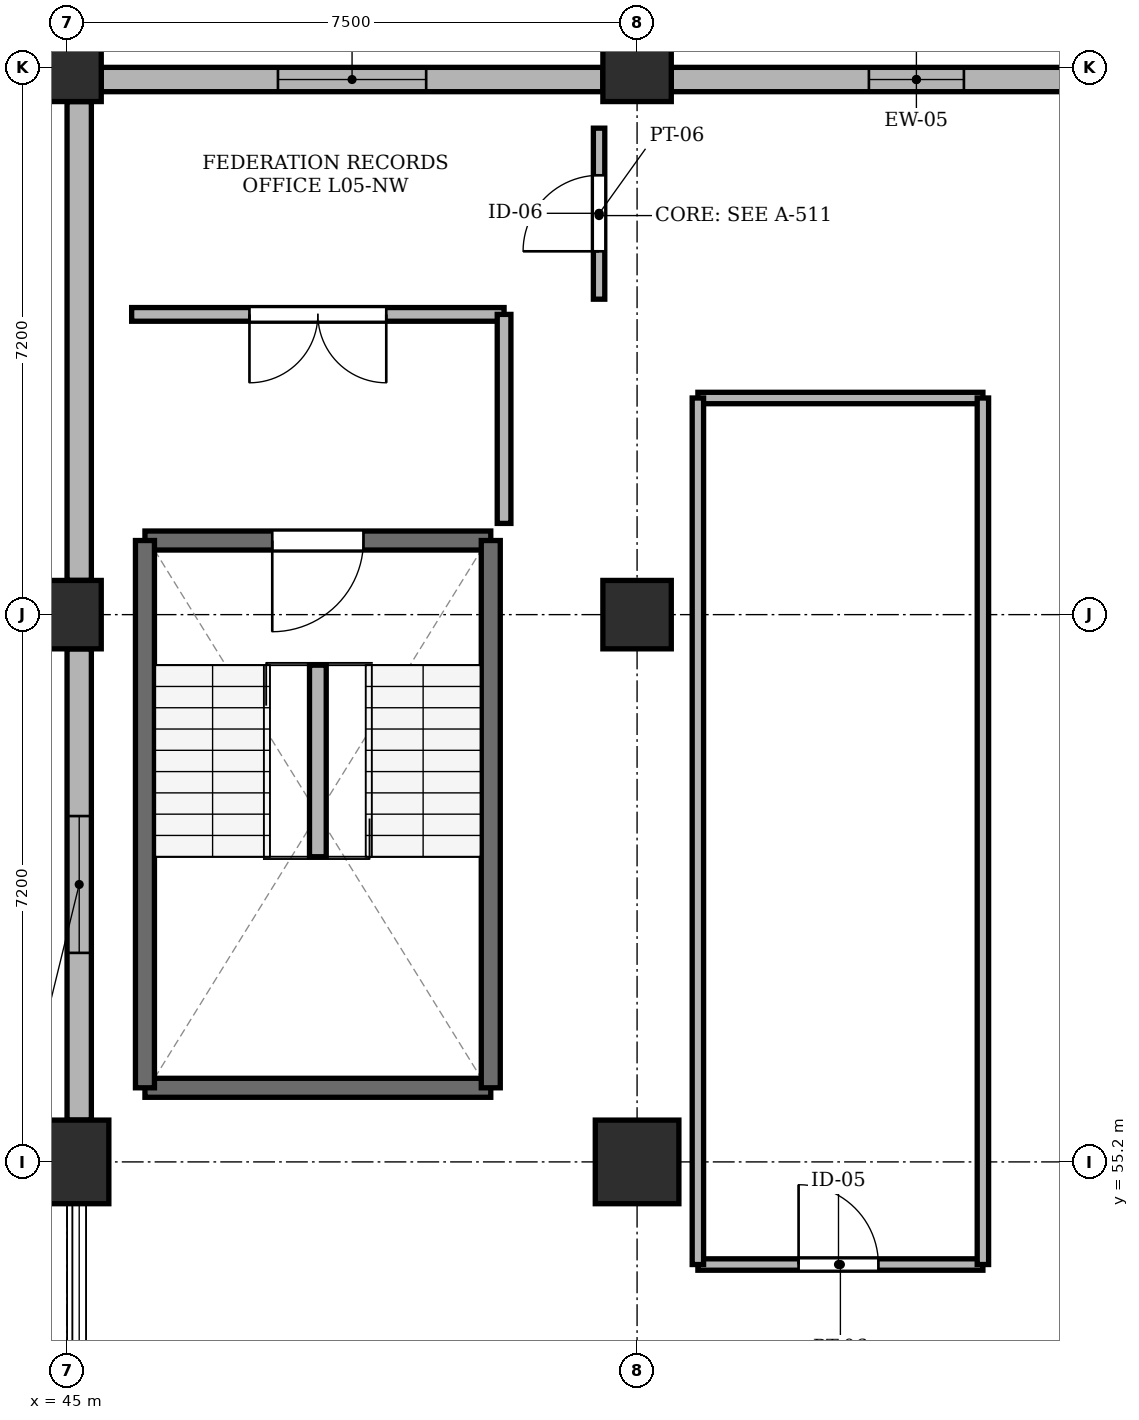
"""IFC4 building model, lengths in metres.
Left out: names, types, materials, properties, quantities, classifications, styles, units other than length and angle.
Written with IfcOpenShell. Run it as: python <this file> out.ifc"""

import sys

from ifc_helpers import new_model, si_unit, direction, frame, frame_2d, origin, origin_2d, place, context, subcontext, project, spatial, rectangle, extrude, element, fill, save


model = new_model("IFC4")
c1 = context("Model", 3, precision=1e-05, world=origin(), true_north=direction((0.0, 1.0)))
c2 = subcontext(c1, "Body", "Model", "MODEL_VIEW")
j1 = project(units=[si_unit("LENGTHUNIT", "METRE"), si_unit("PLANEANGLEUNIT", "RADIAN")], contexts=[c1])
p1 = place(None, origin())
s1 = spatial("IfcSite", under=j1, at=p1, CompositionType="ELEMENT")
p2 = place(p1, origin())
s2 = spatial("IfcBuilding", under=s1, at=p2, CompositionType="ELEMENT")
p3 = place(p2, frame((0.0, 0.0, 27.55)))
s3 = spatial("IfcBuildingStorey", under=s2, at=p3, CompositionType="ELEMENT", Elevation=27.55)
p4 = place(p3, frame((45.0, 55.2, -0.26), z_axis=(0.0, 0.0, 1.0), x_axis=(1.0, 0.0, 0.0)))
e1 = element("IfcColumn", 1, at=p4, inside=s3, PredefinedType="COLUMN", context=c2, shape_type="SweptSolid", body=[
    extrude(rectangle(XDim=1.1, YDim=1.1, at=origin_2d()), origin(), (0.0, 0.0, 1.0), 3.25),
])
for number, where, z_axis, x_axis in (
    (2, (45.0, 62.4, -0.26), (0.0, 0.0, 1.0), (1.0, 0.0, 0.0)),
    (3, (45.0, 69.6, -0.26), (0.0, 0.0, 1.0), (1.0, 0.0, 0.0)),
):
    element("IfcColumn", number, at=place(p3, frame(where, z_axis=z_axis, x_axis=x_axis)), inside=s3, PredefinedType="COLUMN", context=c2, shape_type="SweptSolid", body=[
        extrude(rectangle(XDim=0.9, YDim=0.9, at=origin_2d()), origin(), (0.0, 0.0, 1.0), 3.25),
    ])
p5 = place(p3, frame((52.5, 55.2, -0.26), z_axis=(0.0, 0.0, 1.0), x_axis=(1.0, 0.0, 0.0)))
e4 = element("IfcColumn", 4, at=p5, inside=s3, PredefinedType="COLUMN", context=c2, shape_type="SweptSolid", body=[
    extrude(rectangle(XDim=1.1, YDim=1.1, at=origin_2d()), origin(), (0.0, 0.0, 1.0), 3.25),
])
for number, where, z_axis, x_axis in (
    (5, (52.5, 62.4, -0.26), (0.0, 0.0, 1.0), (1.0, 0.0, 0.0)),
    (6, (52.5, 69.6, -0.26), (0.0, 0.0, 1.0), (1.0, 0.0, 0.0)),
):
    element("IfcColumn", number, at=place(p3, frame(where, z_axis=z_axis, x_axis=x_axis)), inside=s3, PredefinedType="COLUMN", context=c2, shape_type="SweptSolid", body=[
        extrude(rectangle(XDim=0.9, YDim=0.9, at=origin_2d()), origin(), (0.0, 0.0, 1.0), 3.25),
    ])
p6 = place(p3, frame((59.4, 69.44, 0.0), z_axis=(0.0, 0.0, 1.0), x_axis=(-1.0, 0.0, 0.0)))
e7 = element("IfcWall", 7, at=p6, inside=s3, PredefinedType="SOLIDWALL", context=c2, shape_type="SweptSolid", body=[
    extrude(rectangle(XDim=6.45, YDim=0.32, at=frame_2d((3.225, 0.0))), origin(), (0.0, 0.0, 1.0), 2.53),
])
p7 = place(p6, frame((2.6, 0.0, 0.62)))
e8 = element("IfcOpeningElement", 8, at=p7, cuts=e7, PredefinedType="OPENING", context=c2, shape_type="SweptSolid", body=[
    extrude(rectangle(XDim=1.25, YDim=1.75, at=frame_2d((0.625, 0.875))), frame((0.0, 0.172, 0.0), z_axis=(0.0, -1.0, 0.0), x_axis=(1.0, 0.0, 0.0)), (0.0, 0.0, 1.0), 0.344),
])
p8 = place(p3, frame((52.05, 69.44, 0.0), z_axis=(0.0, 0.0, 1.0), x_axis=(-1.0, 0.0, 0.0)))
e9 = element("IfcWall", 9, at=p8, inside=s3, PredefinedType="SOLIDWALL", context=c2, shape_type="SweptSolid", body=[
    extrude(rectangle(XDim=6.6, YDim=0.32, at=frame_2d((3.3, 0.0))), origin(), (0.0, 0.0, 1.0), 2.53),
])
p9 = place(p8, frame((2.325, 0.0, 0.62)))
e10 = element("IfcOpeningElement", 10, at=p9, cuts=e9, PredefinedType="OPENING", context=c2, shape_type="SweptSolid", body=[
    extrude(rectangle(XDim=1.95, YDim=1.81, at=frame_2d((0.975, 0.905))), frame((0.0, 0.172, 0.0), z_axis=(0.0, -1.0, 0.0), x_axis=(1.0, 0.0, 0.0)), (0.0, 0.0, 1.0), 0.344),
])
p10 = place(p3, frame((45.16, 69.15, 0.0), z_axis=(0.0, 0.0, 1.0), x_axis=(0.0, -1.0, 0.0)))
e11 = element("IfcWall", 11, at=p10, inside=s3, PredefinedType="SOLIDWALL", context=c2, shape_type="SweptSolid", body=[
    extrude(rectangle(XDim=6.3, YDim=0.32, at=frame_2d((3.15, 0.0))), origin(), (0.0, 0.0, 1.0), 2.53),
])
p11 = place(p3, frame((45.16, 61.95, 0.0), z_axis=(0.0, 0.0, 1.0), x_axis=(0.0, -1.0, 0.0)))
e12 = element("IfcWall", 12, at=p11, inside=s3, PredefinedType="SOLIDWALL", context=c2, shape_type="SweptSolid", body=[
    extrude(rectangle(XDim=6.2, YDim=0.32, at=frame_2d((3.1, 0.0))), origin(), (0.0, 0.0, 1.0), 2.53),
])
p12 = place(p11, frame((2.2, 0.0, 0.62)))
e13 = element("IfcOpeningElement", 13, at=p12, cuts=e12, PredefinedType="OPENING", context=c2, shape_type="SweptSolid", body=[
    extrude(rectangle(XDim=1.8, YDim=1.81, at=frame_2d((0.9, 0.905))), frame((0.0, 0.172, 0.0), z_axis=(0.0, -1.0, 0.0), x_axis=(1.0, 0.0, 0.0)), (0.0, 0.0, 1.0), 0.344),
])
p13 = place(p3, frame((46.025, 56.175, 0.0), z_axis=(0.0, 0.0, 1.0), x_axis=(1.0, 0.0, 0.0)))
e14 = element("IfcWall", 14, at=p13, inside=s3, PredefinedType="SHEAR", context=c2, shape_type="SweptSolid", body=[
    extrude(rectangle(XDim=4.55, YDim=0.25, at=frame_2d((2.275, 0.0))), origin(), (0.0, 0.0, 1.0), 2.99),
])
p14 = place(p3, frame((50.575, 63.375, 0.0), z_axis=(0.0, 0.0, 1.0), x_axis=(-1.0, 0.0, 0.0)))
e15 = element("IfcWall", 15, at=p14, inside=s3, PredefinedType="SHEAR", context=c2, shape_type="SweptSolid", body=[
    extrude(rectangle(XDim=4.55, YDim=0.25, at=frame_2d((2.275, 0.0))), origin(), (0.0, 0.0, 1.0), 2.99),
])
p15 = place(p14, frame((1.675, 0.0, 0.0)))
e16 = element("IfcOpeningElement", 16, at=p15, cuts=e15, PredefinedType="OPENING", context=c2, shape_type="SweptSolid", body=[
    extrude(rectangle(XDim=1.2, YDim=2.2, at=frame_2d((0.6, 1.1))), frame((0.0, 0.137, 0.0), z_axis=(0.0, -1.0, 0.0), x_axis=(1.0, 0.0, 0.0)), (0.0, 0.0, 1.0), 0.274),
])
for number, where, z_axis, x_axis in (
    (17, (46.025, 63.375, 0.0), (0.0, 0.0, 1.0), (0.0, -1.0, 0.0)),
    (18, (50.575, 56.175, 0.0), (0.0, 0.0, 1.0), (0.0, 1.0, 0.0)),
):
    element("IfcWall", number, at=place(p3, frame(where, z_axis=z_axis, x_axis=x_axis)), inside=s3, PredefinedType="SHEAR", context=c2, shape_type="SweptSolid", body=[
        extrude(rectangle(XDim=7.2, YDim=0.25, at=frame_2d((3.6, 0.0))), origin(), (0.0, 0.0, 1.0), 2.99),
    ])
p16 = place(p3, frame((48.3, 59.215, 0.0), z_axis=(0.0, 0.0, 1.0), x_axis=(0.0, 1.0, 0.0)))
e19 = element("IfcWall", 19, at=p16, inside=s3, PredefinedType="PARTITIONING", context=c2, shape_type="SweptSolid", body=[
    extrude(rectangle(XDim=2.52, YDim=0.22, at=frame_2d((1.26, 0.0))), origin(), (0.0, 0.0, 1.0), 2.99),
])
p17 = place(p3, frame((45.85, 66.35, 0.0), z_axis=(0.0, 0.0, 1.0), x_axis=(1.0, 0.0, 0.0)))
e20 = element("IfcWall", 20, at=p17, inside=s3, PredefinedType="PARTITIONING", context=c2, shape_type="SweptSolid", body=[
    extrude(rectangle(XDim=4.9, YDim=0.18, at=frame_2d((2.45, 0.0))), origin(), (0.0, 0.0, 1.0), 2.53),
])
p18 = place(p17, frame((1.55, 0.0, 0.0)))
e21 = element("IfcOpeningElement", 21, at=p18, cuts=e20, PredefinedType="OPENING", context=c2, shape_type="SweptSolid", body=[
    extrude(rectangle(XDim=1.8, YDim=2.2, at=frame_2d((0.9, 1.1))), frame((0.0, 0.102, 0.0), z_axis=(0.0, -1.0, 0.0), x_axis=(1.0, 0.0, 0.0)), (0.0, 0.0, 1.0), 0.204),
])
p19 = place(p3, frame((50.75, 63.6, 0.0), z_axis=(0.0, 0.0, 1.0), x_axis=(0.0, 1.0, 0.0)))
e22 = element("IfcWall", 22, at=p19, inside=s3, PredefinedType="PARTITIONING", context=c2, shape_type="SweptSolid", body=[
    extrude(rectangle(XDim=2.75, YDim=0.18, at=frame_2d((1.375, 0.0))), origin(), (0.0, 0.0, 1.0), 2.53),
])
p20 = place(p3, frame((53.3, 53.85, 0.0), z_axis=(0.0, 0.0, 1.0), x_axis=(1.0, 0.0, 0.0)))
e23 = element("IfcWall", 23, at=p20, inside=s3, PredefinedType="PARTITIONING", context=c2, shape_type="SweptSolid", body=[
    extrude(rectangle(XDim=3.75, YDim=0.15, at=frame_2d((1.875, 0.0))), origin(), (0.0, 0.0, 1.0), 2.53),
])
p21 = place(p20, frame((1.325, 0.0, 0.0)))
e24 = element("IfcOpeningElement", 24, at=p21, cuts=e23, PredefinedType="OPENING", context=c2, shape_type="SweptSolid", body=[
    extrude(rectangle(XDim=1.05, YDim=2.15, at=frame_2d((0.525, 1.075))), frame((0.0, 0.087, 0.0), z_axis=(0.0, -1.0, 0.0), x_axis=(1.0, 0.0, 0.0)), (0.0, 0.0, 1.0), 0.174),
])
p22 = place(p3, frame((53.3, 65.25, 0.0), z_axis=(0.0, 0.0, 1.0), x_axis=(1.0, 0.0, 0.0)))
e25 = element("IfcWall", 25, at=p22, inside=s3, PredefinedType="PARTITIONING", context=c2, shape_type="SweptSolid", body=[
    extrude(rectangle(XDim=3.75, YDim=0.15, at=frame_2d((1.875, 0.0))), origin(), (0.0, 0.0, 1.0), 2.53),
])
for number, where, z_axis, x_axis in (
    (26, (53.3, 53.85, 0.0), (0.0, 0.0, 1.0), (0.0, 1.0, 0.0)),
    (27, (57.05, 53.85, 0.0), (0.0, 0.0, 1.0), (0.0, 1.0, 0.0)),
):
    element("IfcWall", number, at=place(p3, frame(where, z_axis=z_axis, x_axis=x_axis)), inside=s3, PredefinedType="PARTITIONING", context=c2, shape_type="SweptSolid", body=[
        extrude(rectangle(XDim=11.4, YDim=0.15, at=frame_2d((5.7, 0.0))), origin(), (0.0, 0.0, 1.0), 2.53),
    ])
p23 = place(p3, frame((52.0, 66.55, 0.0), z_axis=(0.0, 0.0, 1.0), x_axis=(0.0, 1.0, 0.0)))
e28 = element("IfcWall", 28, at=p23, inside=s3, PredefinedType="PARTITIONING", context=c2, shape_type="SweptSolid", body=[
    extrude(rectangle(XDim=2.25, YDim=0.15, at=frame_2d((1.125, 0.0))), origin(), (0.0, 0.0, 1.0), 2.53),
])
p24 = place(p23, frame((0.63, 0.0, 0.0)))
e29 = element("IfcOpeningElement", 29, at=p24, cuts=e28, PredefinedType="OPENING", context=c2, shape_type="SweptSolid", body=[
    extrude(rectangle(XDim=1.0, YDim=2.15, at=frame_2d((0.5, 1.075))), frame((0.0, 0.087, 0.0), z_axis=(0.0, -1.0, 0.0), x_axis=(1.0, 0.0, 0.0)), (0.0, 0.0, 1.0), 0.174),
])
p25 = place(p7, origin())
e30 = element("IfcWindow", 30, at=p25, inside=s3, PartitioningType="SINGLE_PANEL", PredefinedType="WINDOW", context=c2, shape_type="SweptSolid", body=[
    extrude(rectangle(XDim=1.25, YDim=1.75, at=frame_2d((0.625, 0.875))), frame((0.0, 0.03, 0.0), z_axis=(0.0, -1.0, 0.0), x_axis=(1.0, 0.0, 0.0)), (0.0, 0.0, 1.0), 0.06),
])
fill(e8, e30)
p26 = place(p9, origin())
e31 = element("IfcWindow", 31, at=p26, inside=s3, PartitioningType="SINGLE_PANEL", PredefinedType="WINDOW", context=c2, shape_type="SweptSolid", body=[
    extrude(rectangle(XDim=1.95, YDim=1.81, at=frame_2d((0.975, 0.905))), frame((0.0, 0.03, 0.0), z_axis=(0.0, -1.0, 0.0), x_axis=(1.0, 0.0, 0.0)), (0.0, 0.0, 1.0), 0.06),
])
fill(e10, e31)
p27 = place(p12, origin())
e32 = element("IfcWindow", 32, at=p27, inside=s3, PartitioningType="SINGLE_PANEL", PredefinedType="WINDOW", context=c2, shape_type="SweptSolid", body=[
    extrude(rectangle(XDim=1.8, YDim=1.81, at=frame_2d((0.9, 0.905))), frame((0.0, 0.03, 0.0), z_axis=(0.0, -1.0, 0.0), x_axis=(1.0, 0.0, 0.0)), (0.0, 0.0, 1.0), 0.06),
])
fill(e13, e32)
p28 = place(p15, origin())
e33 = element("IfcDoor", 33, at=p28, inside=s3, OperationType="SINGLE_SWING_RIGHT", PredefinedType="DOOR", context=c2, shape_type="SweptSolid", body=[
    extrude(rectangle(XDim=1.2, YDim=2.2, at=frame_2d((0.6, 1.1))), frame((0.0, 0.025, 0.0), z_axis=(0.0, -1.0, 0.0), x_axis=(1.0, 0.0, 0.0)), (0.0, 0.0, 1.0), 0.05),
])
fill(e16, e33)
p29 = place(p18, frame((1.8, 0.0, 0.0), z_axis=(0.0, 0.0, 1.0), x_axis=(-1.0, 0.0, 0.0)))
e34 = element("IfcDoor", 34, at=p29, inside=s3, OperationType="DOUBLE_DOOR_SINGLE_SWING", PredefinedType="DOOR", context=c2, shape_type="SweptSolid", body=[
    extrude(rectangle(XDim=1.8, YDim=2.2, at=frame_2d((0.9, 1.1))), frame((0.0, 0.025, 0.0), z_axis=(0.0, -1.0, 0.0), x_axis=(1.0, 0.0, 0.0)), (0.0, 0.0, 1.0), 0.05),
])
fill(e21, e34)
p30 = place(p21, origin())
e35 = element("IfcDoor", 35, at=p30, inside=s3, OperationType="SINGLE_SWING_LEFT", PredefinedType="DOOR", context=c2, shape_type="SweptSolid", body=[
    extrude(rectangle(XDim=1.05, YDim=2.15, at=frame_2d((0.525, 1.075))), frame((0.0, 0.025, 0.0), z_axis=(0.0, -1.0, 0.0), x_axis=(1.0, 0.0, 0.0)), (0.0, 0.0, 1.0), 0.05),
])
fill(e24, e35)
p31 = place(p24, origin())
e36 = element("IfcDoor", 36, at=p31, inside=s3, OperationType="SINGLE_SWING_LEFT", PredefinedType="DOOR", context=c2, shape_type="SweptSolid", body=[
    extrude(rectangle(XDim=1.0, YDim=2.15, at=frame_2d((0.5, 1.075))), frame((0.0, 0.025, 0.0), z_axis=(0.0, -1.0, 0.0), x_axis=(1.0, 0.0, 0.0)), (0.0, 0.0, 1.0), 0.05),
])
fill(e29, e36)
save(model, sys.argv[1])
